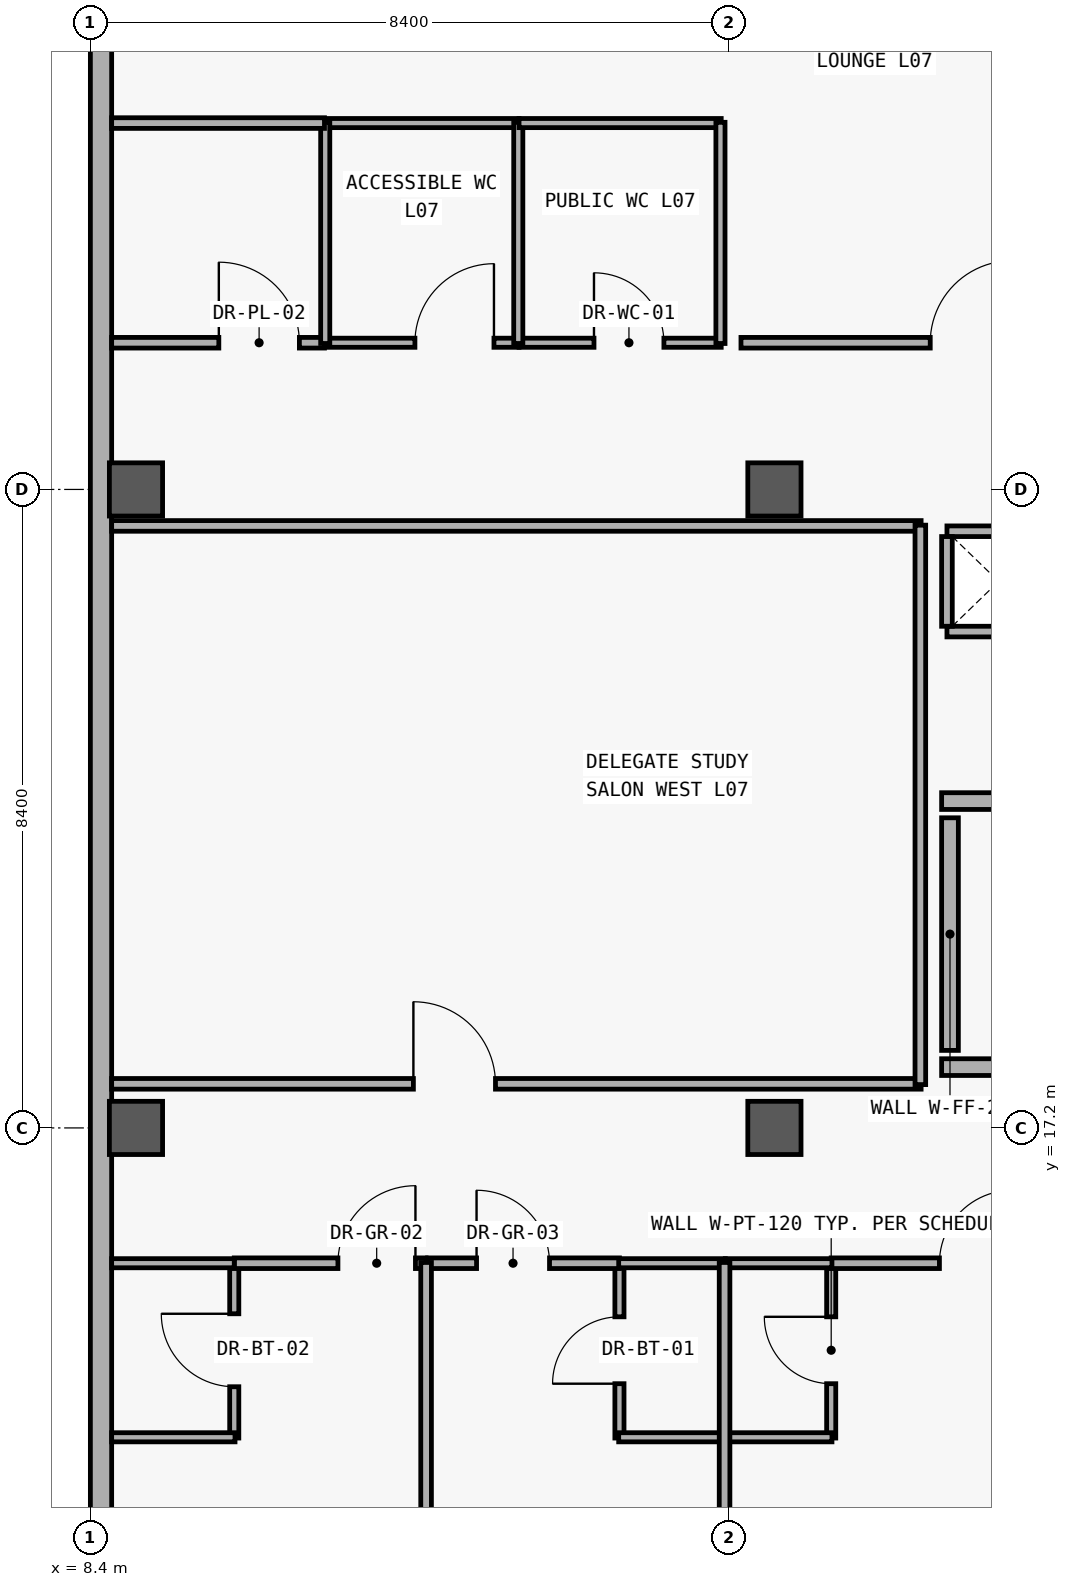
"""IFC4 building model, lengths in metres.
Left out: names, types, materials, properties, quantities, classifications, styles, units other than length and angle.
Written with IfcOpenShell. Run it as: python <this file> out.ifc"""

import sys

from ifc_helpers import new_model, si_unit, direction, frame, frame_2d, origin, origin_2d, place, context, subcontext, project, spatial, rectangle, extrude, element, fill, save


model = new_model("IFC4")
c1 = context("Model", 3, precision=1e-05, world=origin(), true_north=direction((0.0, 1.0)))
c2 = subcontext(c1, "Body", "Model", "MODEL_VIEW")
j1 = project(units=[si_unit("LENGTHUNIT", "METRE"), si_unit("PLANEANGLEUNIT", "RADIAN")], contexts=[c1])
p1 = place(None, origin())
s1 = spatial("IfcSite", under=j1, at=p1, CompositionType="ELEMENT")
p2 = place(p1, origin())
s2 = spatial("IfcBuilding", under=s1, at=p2, CompositionType="ELEMENT")
p3 = place(p2, frame((0.0, 0.0, 30.0)))
s3 = spatial("IfcBuildingStorey", under=s2, at=p3, CompositionType="ELEMENT", Elevation=30.0)
for number, where, z_axis, x_axis in (
    (1, (9.0, 17.2, 0.0), (0.0, 0.0, 1.0), (1.0, 0.0, 0.0)),
    (2, (9.0, 25.6, 0.0), (0.0, 0.0, 1.0), (1.0, 0.0, 0.0)),
    (3, (17.4, 17.2, 0.0), (0.0, 0.0, 1.0), (1.0, 0.0, 0.0)),
    (4, (17.4, 25.6, 0.0), (0.0, 0.0, 1.0), (1.0, 0.0, 0.0)),
):
    element("IfcColumn", number, at=place(p3, frame(where, z_axis=z_axis, x_axis=x_axis)), inside=s3, PredefinedType="COLUMN", context=c2, shape_type="SweptSolid", body=[
        extrude(rectangle(XDim=0.7, YDim=0.7, at=origin_2d()), origin(), (0.0, 0.0, 1.0), 3.6),
    ])
p4 = place(p3, frame((8.54, 8.8, 0.0), z_axis=(0.0, 0.0, 1.0), x_axis=(0.0, 1.0, 0.0)))
e5 = element("IfcWall", 5, at=p4, inside=s3, PredefinedType="SOLIDWALL", context=c2, shape_type="SweptSolid", body=[
    extrude(rectangle(XDim=25.2, YDim=0.28, at=frame_2d((12.6, 0.0))), origin(), (0.0, 0.0, 1.0), 3.34),
])
p5 = place(p4, frame((1.7, 0.0, 0.95)))
e6 = element("IfcOpeningElement", 6, at=p5, cuts=e5, PredefinedType="OPENING", context=c2, shape_type="SweptSolid", body=[
    extrude(rectangle(XDim=1.6, YDim=1.6, at=frame_2d((0.8, 0.8))), frame((0.0, 0.15, 0.0), z_axis=(0.0, -1.0, 0.0), x_axis=(1.0, 0.0, 0.0)), (0.0, 0.0, 1.0), 0.3),
])
p6 = place(p3, frame((19.6, 18.0, 0.0), z_axis=(0.0, 0.0, 1.0), x_axis=(1.0, 0.0, 0.0)))
e7 = element("IfcWall", 7, at=p6, inside=s3, PredefinedType="SOLIDWALL", context=c2, shape_type="SweptSolid", body=[
    extrude(rectangle(XDim=4.8, YDim=0.22, at=frame_2d((2.4, 0.0))), origin(), (0.0, 0.0, 1.0), 2.47),
])
p7 = place(p3, frame((19.6, 21.5, 0.0), z_axis=(0.0, 0.0, 1.0), x_axis=(1.0, 0.0, 0.0)))
e8 = element("IfcWall", 8, at=p7, inside=s3, PredefinedType="SOLIDWALL", context=c2, shape_type="SweptSolid", body=[
    extrude(rectangle(XDim=4.8, YDim=0.22, at=frame_2d((2.4, 0.0))), origin(), (0.0, 0.0, 1.0), 2.47),
])
p8 = place(p7, frame((2.05, 0.0, 0.0)))
e9 = element("IfcOpeningElement", 9, at=p8, cuts=e8, PredefinedType="OPENING", context=c2, shape_type="SweptSolid", body=[
    extrude(rectangle(XDim=1.25, YDim=2.2, at=frame_2d((0.625, 1.1))), frame((0.0, 0.12, 0.0), z_axis=(0.0, -1.0, 0.0), x_axis=(1.0, 0.0, 0.0)), (0.0, 0.0, 1.0), 0.24),
])
p9 = place(p3, frame((19.71, 18.22, 0.0), z_axis=(0.0, 0.0, 1.0), x_axis=(0.0, 1.0, 0.0)))
e10 = element("IfcWall", 10, at=p9, inside=s3, PredefinedType="SOLIDWALL", context=c2, shape_type="SweptSolid", body=[
    extrude(rectangle(XDim=3.06, YDim=0.22, at=frame_2d((1.53, 0.0))), origin(), (0.0, 0.0, 1.0), 2.47),
])
p10 = place(p3, frame((10.293, 13.12, 0.0), z_axis=(0.0, 0.0, 1.0), x_axis=(0.0, 1.0, 0.0)))
e11 = element("IfcWall", 11, at=p10, inside=s3, PredefinedType="PARTITIONING", context=c2, shape_type="SweptSolid", body=[
    extrude(rectangle(XDim=2.31, YDim=0.12, at=frame_2d((1.155, 0.0))), origin(), (0.0, 0.0, 1.0), 2.48),
])
p11 = place(p10, frame((0.675, 0.0, 0.0)))
e12 = element("IfcOpeningElement", 12, at=p11, cuts=e11, PredefinedType="OPENING", context=c2, shape_type="SweptSolid", body=[
    extrude(rectangle(XDim=0.96, YDim=2.15, at=frame_2d((0.48, 1.075))), frame((0.0, 0.07, 0.0), z_axis=(0.0, -1.0, 0.0), x_axis=(1.0, 0.0, 0.0)), (0.0, 0.0, 1.0), 0.14),
])
p12 = place(p3, frame((15.361, 13.12, 0.0), z_axis=(0.0, 0.0, 1.0), x_axis=(0.0, 1.0, 0.0)))
e13 = element("IfcWall", 13, at=p12, inside=s3, PredefinedType="PARTITIONING", context=c2, shape_type="SweptSolid", body=[
    extrude(rectangle(XDim=2.31, YDim=0.12, at=frame_2d((1.155, 0.0))), origin(), (0.0, 0.0, 1.0), 2.48),
])
p13 = place(p12, frame((0.715, 0.0, 0.0)))
e14 = element("IfcOpeningElement", 14, at=p13, cuts=e13, PredefinedType="OPENING", context=c2, shape_type="SweptSolid", body=[
    extrude(rectangle(XDim=0.88, YDim=2.15, at=frame_2d((0.44, 1.075))), frame((0.0, 0.07, 0.0), z_axis=(0.0, -1.0, 0.0), x_axis=(1.0, 0.0, 0.0)), (0.0, 0.0, 1.0), 0.14),
])
p14 = place(p3, frame((18.147, 13.12, 0.0), z_axis=(0.0, 0.0, 1.0), x_axis=(0.0, 1.0, 0.0)))
e15 = element("IfcWall", 15, at=p14, inside=s3, PredefinedType="PARTITIONING", context=c2, shape_type="SweptSolid", body=[
    extrude(rectangle(XDim=2.31, YDim=0.12, at=frame_2d((1.155, 0.0))), origin(), (0.0, 0.0, 1.0), 2.48),
])
p15 = place(p14, frame((0.715, 0.0, 0.0)))
e16 = element("IfcOpeningElement", 16, at=p15, cuts=e15, PredefinedType="OPENING", context=c2, shape_type="SweptSolid", body=[
    extrude(rectangle(XDim=0.88, YDim=2.15, at=frame_2d((0.44, 1.075))), frame((0.0, 0.07, 0.0), z_axis=(0.0, -1.0, 0.0), x_axis=(1.0, 0.0, 0.0)), (0.0, 0.0, 1.0), 0.14),
])
p16 = place(p3, frame((11.48, 27.53, 0.0), z_axis=(0.0, 0.0, 1.0), x_axis=(1.0, 0.0, 0.0)))
e17 = element("IfcWall", 17, at=p16, inside=s3, PredefinedType="PARTITIONING", context=c2, shape_type="SweptSolid", body=[
    extrude(rectangle(XDim=2.56, YDim=0.12, at=frame_2d((1.28, 0.0))), origin(), (0.0, 0.0, 1.0), 2.48),
])
p17 = place(p16, frame((1.19, 0.0, 0.0)))
e18 = element("IfcOpeningElement", 18, at=p17, cuts=e17, PredefinedType="OPENING", context=c2, shape_type="SweptSolid", body=[
    extrude(rectangle(XDim=1.04, YDim=2.15, at=frame_2d((0.52, 1.075))), frame((0.0, 0.07, 0.0), z_axis=(0.0, -1.0, 0.0), x_axis=(1.0, 0.0, 0.0)), (0.0, 0.0, 1.0), 0.14),
])
p18 = place(p3, frame((14.04, 27.53, 0.0), z_axis=(0.0, 0.0, 1.0), x_axis=(1.0, 0.0, 0.0)))
e19 = element("IfcWall", 19, at=p18, inside=s3, PredefinedType="PARTITIONING", context=c2, shape_type="SweptSolid", body=[
    extrude(rectangle(XDim=2.66, YDim=0.12, at=frame_2d((1.33, 0.0))), origin(), (0.0, 0.0, 1.0), 2.48),
])
p19 = place(p18, frame((0.986, 0.0, 0.0)))
e20 = element("IfcOpeningElement", 20, at=p19, cuts=e19, PredefinedType="OPENING", context=c2, shape_type="SweptSolid", body=[
    extrude(rectangle(XDim=0.92, YDim=2.15, at=frame_2d((0.46, 1.075))), frame((0.0, 0.07, 0.0), z_axis=(0.0, -1.0, 0.0), x_axis=(1.0, 0.0, 0.0)), (0.0, 0.0, 1.0), 0.14),
])
p20 = place(p3, frame((8.68, 17.78, 0.0), z_axis=(0.0, 0.0, 1.0), x_axis=(1.0, 0.0, 0.0)))
e21 = element("IfcWall", 21, at=p20, inside=s3, PredefinedType="PARTITIONING", context=c2, shape_type="SweptSolid", body=[
    extrude(rectangle(XDim=10.65, YDim=0.14, at=frame_2d((5.325, 0.0))), origin(), (0.0, 0.0, 1.0), 2.48),
])
p21 = place(p20, frame((3.97, 0.0, 0.0)))
e22 = element("IfcOpeningElement", 22, at=p21, cuts=e21, PredefinedType="OPENING", context=c2, shape_type="SweptSolid", body=[
    extrude(rectangle(XDim=1.08, YDim=2.25, at=frame_2d((0.54, 1.125))), frame((0.0, 0.08, 0.0), z_axis=(0.0, -1.0, 0.0), x_axis=(1.0, 0.0, 0.0)), (0.0, 0.0, 1.0), 0.16),
])
p22 = place(p3, frame((10.293, 15.42, 0.0), z_axis=(0.0, 0.0, 1.0), x_axis=(1.0, 0.0, 0.0)))
e23 = element("IfcWall", 23, at=p22, inside=s3, PredefinedType="PARTITIONING", context=c2, shape_type="SweptSolid", body=[
    extrude(rectangle(XDim=2.524, YDim=0.14, at=frame_2d((1.262, 0.0))), origin(), (0.0, 0.0, 1.0), 2.48),
])
p23 = place(p22, frame((1.364, 0.0, 0.0)))
e24 = element("IfcOpeningElement", 24, at=p23, cuts=e23, PredefinedType="OPENING", context=c2, shape_type="SweptSolid", body=[
    extrude(rectangle(XDim=1.02, YDim=2.2, at=frame_2d((0.51, 1.1))), frame((0.0, 0.08, 0.0), z_axis=(0.0, -1.0, 0.0), x_axis=(1.0, 0.0, 0.0)), (0.0, 0.0, 1.0), 0.16),
])
p24 = place(p3, frame((12.837, 15.42, 0.0), z_axis=(0.0, 0.0, 1.0), x_axis=(1.0, 0.0, 0.0)))
e25 = element("IfcWall", 25, at=p24, inside=s3, PredefinedType="PARTITIONING", context=c2, shape_type="SweptSolid", body=[
    extrude(rectangle(XDim=2.524, YDim=0.14, at=frame_2d((1.262, 0.0))), origin(), (0.0, 0.0, 1.0), 2.48),
])
p25 = place(p24, frame((0.644, 0.0, 0.0)))
e26 = element("IfcOpeningElement", 26, at=p25, cuts=e25, PredefinedType="OPENING", context=c2, shape_type="SweptSolid", body=[
    extrude(rectangle(XDim=0.96, YDim=2.25, at=frame_2d((0.48, 1.125))), frame((0.0, 0.08, 0.0), z_axis=(0.0, -1.0, 0.0), x_axis=(1.0, 0.0, 0.0)), (0.0, 0.0, 1.0), 0.16),
])
p26 = place(p3, frame((18.147, 15.42, 0.0), z_axis=(0.0, 0.0, 1.0), x_axis=(1.0, 0.0, 0.0)))
e27 = element("IfcWall", 27, at=p26, inside=s3, PredefinedType="PARTITIONING", context=c2, shape_type="SweptSolid", body=[
    extrude(rectangle(XDim=2.524, YDim=0.14, at=frame_2d((1.262, 0.0))), origin(), (0.0, 0.0, 1.0), 2.48),
])
p27 = place(p26, frame((1.424, 0.0, 0.0)))
e28 = element("IfcOpeningElement", 28, at=p27, cuts=e27, PredefinedType="OPENING", context=c2, shape_type="SweptSolid", body=[
    extrude(rectangle(XDim=0.96, YDim=2.25, at=frame_2d((0.48, 1.125))), frame((0.0, 0.08, 0.0), z_axis=(0.0, -1.0, 0.0), x_axis=(1.0, 0.0, 0.0)), (0.0, 0.0, 1.0), 0.16),
])
p28 = place(p3, frame((8.68, 27.53, 0.0), z_axis=(0.0, 0.0, 1.0), x_axis=(1.0, 0.0, 0.0)))
e29 = element("IfcWall", 29, at=p28, inside=s3, PredefinedType="PARTITIONING", context=c2, shape_type="SweptSolid", body=[
    extrude(rectangle(XDim=2.8, YDim=0.14, at=frame_2d((1.4, 0.0))), origin(), (0.0, 0.0, 1.0), 2.48),
])
p29 = place(p28, frame((1.41, 0.0, 0.0)))
e30 = element("IfcOpeningElement", 30, at=p29, cuts=e29, PredefinedType="OPENING", context=c2, shape_type="SweptSolid", body=[
    extrude(rectangle(XDim=1.06, YDim=2.2, at=frame_2d((0.53, 1.1))), frame((0.0, 0.08, 0.0), z_axis=(0.0, -1.0, 0.0), x_axis=(1.0, 0.0, 0.0)), (0.0, 0.0, 1.0), 0.16),
])
p30 = place(p3, frame((16.96, 27.53, 0.0), z_axis=(0.0, 0.0, 1.0), x_axis=(1.0, 0.0, 0.0)))
e31 = element("IfcWall", 31, at=p30, inside=s3, PredefinedType="PARTITIONING", context=c2, shape_type="SweptSolid", body=[
    extrude(rectangle(XDim=3.71, YDim=0.14, at=frame_2d((1.855, 0.0))), origin(), (0.0, 0.0, 1.0), 2.48),
])
p31 = place(p30, frame((2.49, 0.0, 0.0)))
e32 = element("IfcOpeningElement", 32, at=p31, cuts=e31, PredefinedType="OPENING", context=c2, shape_type="SweptSolid", body=[
    extrude(rectangle(XDim=1.08, YDim=2.25, at=frame_2d((0.54, 1.125))), frame((0.0, 0.08, 0.0), z_axis=(0.0, -1.0, 0.0), x_axis=(1.0, 0.0, 0.0)), (0.0, 0.0, 1.0), 0.16),
])
p32 = place(p3, frame((8.68, 13.13, 0.0), z_axis=(0.0, 0.0, 1.0), x_axis=(1.0, 0.0, 0.0)))
e33 = element("IfcWall", 33, at=p32, inside=s3, PredefinedType="PARTITIONING", context=c2, shape_type="SweptSolid", body=[
    extrude(rectangle(XDim=1.623, YDim=0.12, at=frame_2d((0.812, 0.0))), origin(), (0.0, 0.0, 1.0), 2.48),
])
p33 = place(p3, frame((8.68, 15.42, 0.0), z_axis=(0.0, 0.0, 1.0), x_axis=(1.0, 0.0, 0.0)))
e34 = element("IfcWall", 34, at=p33, inside=s3, PredefinedType="PARTITIONING", context=c2, shape_type="SweptSolid", body=[
    extrude(rectangle(XDim=1.613, YDim=0.12, at=frame_2d((0.807, 0.0))), origin(), (0.0, 0.0, 1.0), 2.48),
])
for number, where, z_axis, x_axis in (
    (35, (15.351, 13.13, 0.0), (0.0, 0.0, 1.0), (1.0, 0.0, 0.0)),
    (36, (15.351, 15.42, 0.0), (0.0, 0.0, 1.0), (1.0, 0.0, 0.0)),
):
    element("IfcWall", number, at=place(p3, frame(where, z_axis=z_axis, x_axis=x_axis)), inside=s3, PredefinedType="PARTITIONING", context=c2, shape_type="SweptSolid", body=[
        extrude(rectangle(XDim=1.403, YDim=0.12, at=frame_2d((0.701, 0.0))), origin(), (0.0, 0.0, 1.0), 2.48),
    ])
for number, where, z_axis, x_axis in (
    (37, (16.754, 13.13, 0.0), (0.0, 0.0, 1.0), (1.0, 0.0, 0.0)),
    (38, (16.754, 15.42, 0.0), (0.0, 0.0, 1.0), (1.0, 0.0, 0.0)),
):
    element("IfcWall", number, at=place(p3, frame(where, z_axis=z_axis, x_axis=x_axis)), inside=s3, PredefinedType="PARTITIONING", context=c2, shape_type="SweptSolid", body=[
        extrude(rectangle(XDim=1.403, YDim=0.12, at=frame_2d((0.702, 0.0))), origin(), (0.0, 0.0, 1.0), 2.48),
    ])
p34 = place(p3, frame((11.48, 30.42, 0.0), z_axis=(0.0, 0.0, 1.0), x_axis=(1.0, 0.0, 0.0)))
e39 = element("IfcWall", 39, at=p34, inside=s3, PredefinedType="PARTITIONING", context=c2, shape_type="SweptSolid", body=[
    extrude(rectangle(XDim=2.56, YDim=0.12, at=frame_2d((1.28, 0.0))), origin(), (0.0, 0.0, 1.0), 2.48),
])
for number, where, z_axis, x_axis in (
    (40, (11.49, 27.52, 0.0), (0.0, 0.0, 1.0), (0.0, 1.0, 0.0)),
    (41, (14.03, 27.52, 0.0), (0.0, 0.0, 1.0), (0.0, 1.0, 0.0)),
):
    element("IfcWall", number, at=place(p3, frame(where, z_axis=z_axis, x_axis=x_axis)), inside=s3, PredefinedType="PARTITIONING", context=c2, shape_type="SweptSolid", body=[
        extrude(rectangle(XDim=2.91, YDim=0.12, at=frame_2d((1.455, 0.0))), origin(), (0.0, 0.0, 1.0), 2.48),
    ])
p35 = place(p3, frame((14.04, 30.42, 0.0), z_axis=(0.0, 0.0, 1.0), x_axis=(1.0, 0.0, 0.0)))
e42 = element("IfcWall", 42, at=p35, inside=s3, PredefinedType="PARTITIONING", context=c2, shape_type="SweptSolid", body=[
    extrude(rectangle(XDim=2.66, YDim=0.12, at=frame_2d((1.33, 0.0))), origin(), (0.0, 0.0, 1.0), 2.48),
])
p36 = place(p3, frame((16.69, 27.52, 0.0), z_axis=(0.0, 0.0, 1.0), x_axis=(0.0, 1.0, 0.0)))
e43 = element("IfcWall", 43, at=p36, inside=s3, PredefinedType="PARTITIONING", context=c2, shape_type="SweptSolid", body=[
    extrude(rectangle(XDim=2.91, YDim=0.12, at=frame_2d((1.455, 0.0))), origin(), (0.0, 0.0, 1.0), 2.48),
])
p37 = place(p3, frame((8.68, 25.12, 0.0), z_axis=(0.0, 0.0, 1.0), x_axis=(1.0, 0.0, 0.0)))
e44 = element("IfcWall", 44, at=p37, inside=s3, PredefinedType="PARTITIONING", context=c2, shape_type="SweptSolid", body=[
    extrude(rectangle(XDim=10.65, YDim=0.14, at=frame_2d((5.325, 0.0))), origin(), (0.0, 0.0, 1.0), 2.48),
])
p38 = place(p3, frame((19.32, 17.77, 0.0), z_axis=(0.0, 0.0, 1.0), x_axis=(0.0, 1.0, 0.0)))
e45 = element("IfcWall", 45, at=p38, inside=s3, PredefinedType="PARTITIONING", context=c2, shape_type="SweptSolid", body=[
    extrude(rectangle(XDim=7.36, YDim=0.14, at=frame_2d((3.68, 0.0))), origin(), (0.0, 0.0, 1.0), 2.48),
])
for number, where, z_axis, x_axis in (
    (46, (12.817, 9.08, 0.0), (0.0, 0.0, 1.0), (0.0, 1.0, 0.0)),
    (47, (16.744, 9.08, 0.0), (0.0, 0.0, 1.0), (0.0, 1.0, 0.0)),
):
    element("IfcWall", number, at=place(p3, frame(where, z_axis=z_axis, x_axis=x_axis)), inside=s3, PredefinedType="PARTITIONING", context=c2, shape_type="SweptSolid", body=[
        extrude(rectangle(XDim=6.35, YDim=0.14, at=frame_2d((3.175, 0.0))), origin(), (0.0, 0.0, 1.0), 2.48),
    ])
p39 = place(p3, frame((8.68, 30.42, 0.0), z_axis=(0.0, 0.0, 1.0), x_axis=(1.0, 0.0, 0.0)))
e48 = element("IfcWall", 48, at=p39, inside=s3, PredefinedType="PARTITIONING", context=c2, shape_type="SweptSolid", body=[
    extrude(rectangle(XDim=2.8, YDim=0.14, at=frame_2d((1.4, 0.0))), origin(), (0.0, 0.0, 1.0), 2.48),
])
for number, where, z_axis, x_axis in (
    (49, (19.67, 23.73, 0.0), (0.0, 0.0, 1.0), (1.0, 0.0, 0.0)),
    (50, (21.03, 25.05, 0.0), (0.0, 0.0, 1.0), (-1.0, 0.0, 0.0)),
):
    element("IfcWall", number, at=place(p3, frame(where, z_axis=z_axis, x_axis=x_axis)), inside=s3, PredefinedType="PARTITIONING", context=c2, shape_type="SweptSolid", body=[
        extrude(rectangle(XDim=1.36, YDim=0.14, at=frame_2d((0.68, 0.0))), origin(), (0.0, 0.0, 1.0), 2.44),
    ])
p40 = place(p3, frame((19.67, 24.98, 0.0), z_axis=(0.0, 0.0, 1.0), x_axis=(0.0, -1.0, 0.0)))
e51 = element("IfcWall", 51, at=p40, inside=s3, PredefinedType="PARTITIONING", context=c2, shape_type="SweptSolid", body=[
    extrude(rectangle(XDim=1.18, YDim=0.14, at=frame_2d((0.59, 0.0))), origin(), (0.0, 0.0, 1.0), 2.44),
])
p41 = place(p11, origin())
e52 = element("IfcDoor", 52, at=p41, inside=s3, OperationType="SINGLE_SWING_RIGHT", PredefinedType="DOOR", context=c2, shape_type="SweptSolid", body=[
    extrude(rectangle(XDim=0.96, YDim=2.15, at=frame_2d((0.48, 1.075))), frame((0.0, 0.025, 0.0), z_axis=(0.0, -1.0, 0.0), x_axis=(1.0, 0.0, 0.0)), (0.0, 0.0, 1.0), 0.05),
])
fill(e12, e52)
p42 = place(p13, origin())
e53 = element("IfcDoor", 53, at=p42, inside=s3, OperationType="SINGLE_SWING_LEFT", PredefinedType="DOOR", context=c2, shape_type="SweptSolid", body=[
    extrude(rectangle(XDim=0.88, YDim=2.15, at=frame_2d((0.44, 1.075))), frame((0.0, 0.025, 0.0), z_axis=(0.0, -1.0, 0.0), x_axis=(1.0, 0.0, 0.0)), (0.0, 0.0, 1.0), 0.05),
])
fill(e14, e53)
p43 = place(p15, origin())
e54 = element("IfcDoor", 54, at=p43, inside=s3, OperationType="SINGLE_SWING_RIGHT", PredefinedType="DOOR", context=c2, shape_type="SweptSolid", body=[
    extrude(rectangle(XDim=0.88, YDim=2.15, at=frame_2d((0.44, 1.075))), frame((0.0, 0.025, 0.0), z_axis=(0.0, -1.0, 0.0), x_axis=(1.0, 0.0, 0.0)), (0.0, 0.0, 1.0), 0.05),
])
fill(e16, e54)
p44 = place(p17, origin())
e55 = element("IfcDoor", 55, at=p44, inside=s3, OperationType="SINGLE_SWING_RIGHT", PredefinedType="DOOR", context=c2, shape_type="SweptSolid", body=[
    extrude(rectangle(XDim=1.04, YDim=2.15, at=frame_2d((0.52, 1.075))), frame((0.0, 0.025, 0.0), z_axis=(0.0, -1.0, 0.0), x_axis=(1.0, 0.0, 0.0)), (0.0, 0.0, 1.0), 0.05),
])
fill(e18, e55)
p45 = place(p19, origin())
e56 = element("IfcDoor", 56, at=p45, inside=s3, OperationType="SINGLE_SWING_LEFT", PredefinedType="DOOR", context=c2, shape_type="SweptSolid", body=[
    extrude(rectangle(XDim=0.92, YDim=2.15, at=frame_2d((0.46, 1.075))), frame((0.0, 0.025, 0.0), z_axis=(0.0, -1.0, 0.0), x_axis=(1.0, 0.0, 0.0)), (0.0, 0.0, 1.0), 0.05),
])
fill(e20, e56)
p46 = place(p21, origin())
e57 = element("IfcDoor", 57, at=p46, inside=s3, OperationType="SINGLE_SWING_LEFT", PredefinedType="DOOR", context=c2, shape_type="SweptSolid", body=[
    extrude(rectangle(XDim=1.08, YDim=2.25, at=frame_2d((0.54, 1.125))), frame((0.0, 0.025, 0.0), z_axis=(0.0, -1.0, 0.0), x_axis=(1.0, 0.0, 0.0)), (0.0, 0.0, 1.0), 0.05),
])
fill(e22, e57)
p47 = place(p23, origin())
e58 = element("IfcDoor", 58, at=p47, inside=s3, OperationType="SINGLE_SWING_RIGHT", PredefinedType="DOOR", context=c2, shape_type="SweptSolid", body=[
    extrude(rectangle(XDim=1.02, YDim=2.2, at=frame_2d((0.51, 1.1))), frame((0.0, 0.025, 0.0), z_axis=(0.0, -1.0, 0.0), x_axis=(1.0, 0.0, 0.0)), (0.0, 0.0, 1.0), 0.05),
])
fill(e24, e58)
p48 = place(p25, origin())
e59 = element("IfcDoor", 59, at=p48, inside=s3, OperationType="SINGLE_SWING_LEFT", PredefinedType="DOOR", context=c2, shape_type="SweptSolid", body=[
    extrude(rectangle(XDim=0.96, YDim=2.25, at=frame_2d((0.48, 1.125))), frame((0.0, 0.025, 0.0), z_axis=(0.0, -1.0, 0.0), x_axis=(1.0, 0.0, 0.0)), (0.0, 0.0, 1.0), 0.05),
])
fill(e26, e59)
p49 = place(p27, origin())
e60 = element("IfcDoor", 60, at=p49, inside=s3, OperationType="SINGLE_SWING_RIGHT", PredefinedType="DOOR", context=c2, shape_type="SweptSolid", body=[
    extrude(rectangle(XDim=0.96, YDim=2.25, at=frame_2d((0.48, 1.125))), frame((0.0, 0.025, 0.0), z_axis=(0.0, -1.0, 0.0), x_axis=(1.0, 0.0, 0.0)), (0.0, 0.0, 1.0), 0.05),
])
fill(e28, e60)
p50 = place(p29, origin())
e61 = element("IfcDoor", 61, at=p50, inside=s3, OperationType="SINGLE_SWING_LEFT", PredefinedType="DOOR", context=c2, shape_type="SweptSolid", body=[
    extrude(rectangle(XDim=1.06, YDim=2.2, at=frame_2d((0.53, 1.1))), frame((0.0, 0.025, 0.0), z_axis=(0.0, -1.0, 0.0), x_axis=(1.0, 0.0, 0.0)), (0.0, 0.0, 1.0), 0.05),
])
fill(e30, e61)
p51 = place(p31, origin())
e62 = element("IfcDoor", 62, at=p51, inside=s3, OperationType="SINGLE_SWING_RIGHT", PredefinedType="DOOR", context=c2, shape_type="SweptSolid", body=[
    extrude(rectangle(XDim=1.08, YDim=2.25, at=frame_2d((0.54, 1.125))), frame((0.0, 0.025, 0.0), z_axis=(0.0, -1.0, 0.0), x_axis=(1.0, 0.0, 0.0)), (0.0, 0.0, 1.0), 0.05),
])
fill(e32, e62)
save(model, sys.argv[1])
